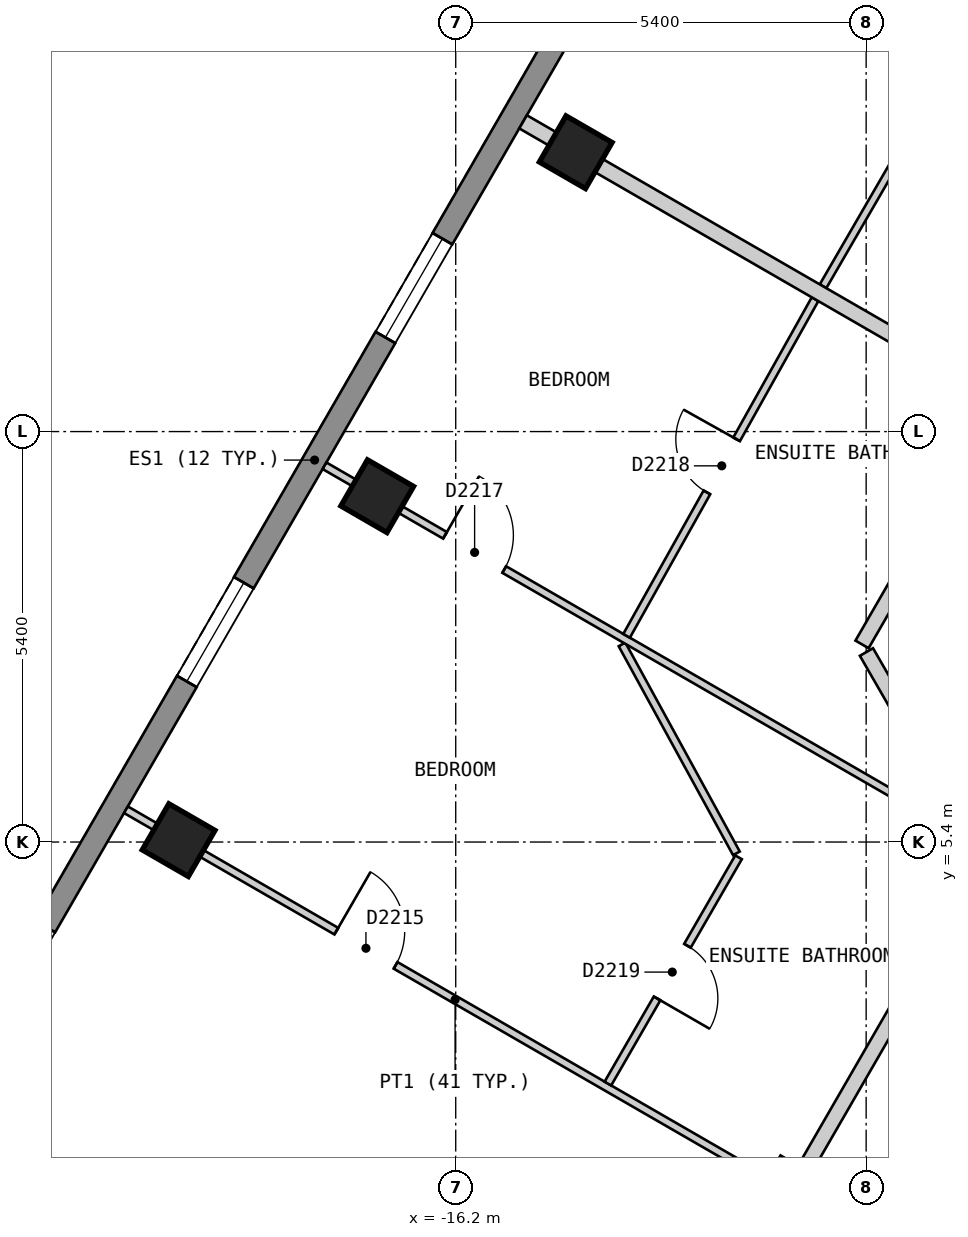
"""IFC4 building model, lengths in metres.
Left out: names, types, materials, properties, quantities, classifications, styles, units other than length and angle.
Written with IfcOpenShell. Run it as: python <this file> out.ifc"""

import sys

from ifc_helpers import new_model, si_unit, direction, frame, frame_2d, origin, origin_2d, place, context, subcontext, project, spatial, polyline, rectangle, outline, extrude, element, fill, save


model = new_model("IFC4")
c1 = context("Model", 3, precision=1e-05, world=origin(), true_north=direction((0.0, 1.0)))
c2 = subcontext(c1, "Body", "Model", "MODEL_VIEW")
j1 = project(units=[si_unit("LENGTHUNIT", "METRE"), si_unit("PLANEANGLEUNIT", "RADIAN")], contexts=[c1])
p1 = place(None, origin())
s1 = spatial("IfcSite", under=j1, at=p1, CompositionType="ELEMENT")
p2 = place(p1, origin())
s2 = spatial("IfcBuilding", under=s1, at=p2, CompositionType="ELEMENT")
p3 = place(p2, frame((0.0, 0.0, 223.8)))
s3 = spatial("IfcBuildingStorey", under=s2, at=p3, CompositionType="ELEMENT", Elevation=223.8)
for number, where, z_axis, x_axis in (
    (1, (-14.621, 14.475, 0.0), (0.0, 0.0, 1.0), (-0.5, -0.866, 0.0)),
    (2, (-17.233, 9.95, 0.0), (0.0, 0.0, 1.0), (-0.5, -0.866, 0.0)),
    (3, (-19.846, 5.425, 0.0), (0.0, 0.0, 1.0), (-0.5, -0.866, 0.0)),
    (4, (-11.792, 0.775, 0.0), (0.0, 0.0, 1.0), (-0.5, -0.866, 0.0)),
):
    element("IfcColumn", number, at=place(p3, frame(where, z_axis=z_axis, x_axis=x_axis)), inside=s3, PredefinedType="COLUMN", context=c2, shape_type="SweptSolid", body=[
        extrude(rectangle(XDim=0.7, YDim=0.7, at=origin_2d()), origin(), (0.0, 0.0, 1.0), 3.0),
    ])
p4 = place(p3, frame((-12.514, 20.025, 0.0), z_axis=(0.0, 0.0, 1.0), x_axis=(-0.500003656944, -0.866023292436, 0.0)))
e5 = element("IfcWall", 5, at=p4, inside=s3, PredefinedType="SOLIDWALL", context=c2, shape_type="SweptSolid", body=[
    extrude(outline(polyline([(0.0, -0.15), (22.17, -0.15), (22.09, 0.15), (0.08, 0.15), (0.0, -0.15)])), origin(), (0.0, 0.0, 1.0), 2.7),
])
p5 = place(p4, frame((2.497, 0.0, 0.15)))
e6 = element("IfcOpeningElement", 6, at=p5, cuts=e5, PredefinedType="OPENING", context=c2, shape_type="SweptSolid", body=[
    extrude(rectangle(XDim=1.5, YDim=2.1, at=frame_2d((0.75, 1.05))), frame((0.0, 0.16, 0.0), z_axis=(0.0, -1.0, 0.0), x_axis=(1.0, 0.0, 0.0)), (0.0, 0.0, 1.0), 0.32),
])
p6 = place(p4, frame((7.722, 0.0, 0.15)))
e7 = element("IfcOpeningElement", 7, at=p6, cuts=e5, PredefinedType="OPENING", context=c2, shape_type="SweptSolid", body=[
    extrude(rectangle(XDim=1.5, YDim=2.1, at=frame_2d((0.75, 1.05))), frame((0.0, 0.16, 0.0), z_axis=(0.0, -1.0, 0.0), x_axis=(1.0, 0.0, 0.0)), (0.0, 0.0, 1.0), 0.32),
])
p7 = place(p4, frame((12.948, 0.0, 0.15)))
e8 = element("IfcOpeningElement", 8, at=p7, cuts=e5, PredefinedType="OPENING", context=c2, shape_type="SweptSolid", body=[
    extrude(rectangle(XDim=1.5, YDim=2.1, at=frame_2d((0.75, 1.05))), frame((0.0, 0.16, 0.0), z_axis=(0.0, -1.0, 0.0), x_axis=(1.0, 0.0, 0.0)), (0.0, 0.0, 1.0), 0.32),
])
p8 = place(p4, frame((18.173, 0.0, 0.15)))
e9 = element("IfcOpeningElement", 9, at=p8, cuts=e5, PredefinedType="OPENING", context=c2, shape_type="SweptSolid", body=[
    extrude(rectangle(XDim=1.5, YDim=2.1, at=frame_2d((0.75, 1.05))), frame((0.0, 0.16, 0.0), z_axis=(0.0, -1.0, 0.0), x_axis=(1.0, 0.0, 0.0)), (0.0, 0.0, 1.0), 0.32),
])
p9 = place(p3, frame((-10.796, 7.9, 0.0), z_axis=(0.0, 0.0, 1.0), x_axis=(0.499674397761, -0.866213308731, 0.0)))
e10 = element("IfcWall", 10, at=p9, inside=s3, PredefinedType="PARTITIONING", context=c2, shape_type="SweptSolid", body=[
    extrude(rectangle(XDim=2.785, YDim=0.2, at=frame_2d((1.393, 0.0))), origin(), (0.0, 0.0, 1.0), 2.7),
])
p10 = place(p3, frame((-13.106, -1.5, 0.0), z_axis=(0.0, 0.0, 1.0), x_axis=(0.500025705601, 0.86601056214, 0.0)))
e11 = element("IfcWall", 11, at=p10, inside=s3, PredefinedType="PARTITIONING", context=c2, shape_type="SweptSolid", body=[
    extrude(rectangle(XDim=7.735, YDim=0.2, at=frame_2d((3.868, 0.0))), origin(), (0.0, 0.0, 1.0), 2.7),
])
p11 = place(p3, frame((-10.854, 8.0, 0.0), z_axis=(0.0, 0.0, 1.0), x_axis=(0.499997637144, 0.866026767976, 0.0)))
e12 = element("IfcWall", 12, at=p11, inside=s3, PredefinedType="PARTITIONING", context=c2, shape_type="SweptSolid", body=[
    extrude(rectangle(XDim=10.854, YDim=0.2, at=frame_2d((5.427, 0.0))), origin(), (0.0, 0.0, 1.0), 2.7),
])
p12 = place(p3, frame((-14.012, 8.0, 0.0), z_axis=(0.0, 0.0, 1.0), x_axis=(0.480183343847, -0.877168145963, 0.0)))
e13 = element("IfcWall", 13, at=p12, inside=s3, PredefinedType="PARTITIONING", context=c2, shape_type="SweptSolid", body=[
    extrude(rectangle(XDim=3.134, YDim=0.1, at=frame_2d((1.567, 0.0))), origin(), (0.0, 0.0, 1.0), 2.7),
])
p13 = place(p3, frame((-20.539, 5.825, 0.0), z_axis=(0.0, 0.0, 1.0), x_axis=(0.866089650643, -0.499888704662, 0.0)))
e14 = element("IfcWall", 14, at=p13, inside=s3, PredefinedType="PARTITIONING", context=c2, shape_type="SweptSolid", body=[
    extrude(rectangle(XDim=10.0, YDim=0.1, at=frame_2d((5.0, 0.0))), origin(), (0.0, 0.0, 1.0), 2.7),
])
p14 = place(p13, frame((3.196, 0.0, 0.0)))
e15 = element("IfcOpeningElement", 15, at=p14, cuts=e14, PredefinedType="OPENING", context=c2, shape_type="SweptSolid", body=[
    extrude(rectangle(XDim=0.9, YDim=2.1, at=frame_2d((0.45, 1.05))), frame((0.0, 0.06, 0.0), z_axis=(0.0, -1.0, 0.0), x_axis=(1.0, 0.0, 0.0)), (0.0, 0.0, 1.0), 0.12),
])
p15 = place(p3, frame((-17.926, 10.35, 0.0), z_axis=(0.0, 0.0, 1.0), x_axis=(0.866018411306, -0.500012111133, 0.0)))
e16 = element("IfcWall", 16, at=p15, inside=s3, PredefinedType="PARTITIONING", context=c2, shape_type="SweptSolid", body=[
    extrude(rectangle(XDim=9.898, YDim=0.1, at=frame_2d((4.949, 0.0))), origin(), (0.0, 0.0, 1.0), 2.7),
])
p16 = place(p15, frame((1.83, 0.0, 0.0)))
e17 = element("IfcOpeningElement", 17, at=p16, cuts=e16, PredefinedType="OPENING", context=c2, shape_type="SweptSolid", body=[
    extrude(rectangle(XDim=0.9, YDim=2.1, at=frame_2d((0.45, 1.05))), frame((0.0, 0.06, 0.0), z_axis=(0.0, -1.0, 0.0), x_axis=(1.0, 0.0, 0.0)), (0.0, 0.0, 1.0), 0.12),
])
p17 = place(p3, frame((-14.198, 2.222, 0.0), z_axis=(0.0, 0.0, 1.0), x_axis=(0.500042121486, 0.866001083567, 0.0)))
e18 = element("IfcWall", 18, at=p17, inside=s3, PredefinedType="PARTITIONING", context=c2, shape_type="SweptSolid", body=[
    extrude(rectangle(XDim=3.438, YDim=0.1, at=frame_2d((1.719, 0.0))), origin(), (0.0, 0.0, 1.0), 2.7),
])
p18 = place(p17, frame((1.294, 0.0, 0.0)))
e19 = element("IfcOpeningElement", 19, at=p18, cuts=e18, PredefinedType="OPENING", context=c2, shape_type="SweptSolid", body=[
    extrude(rectangle(XDim=0.8, YDim=2.1, at=frame_2d((0.4, 1.05))), frame((0.0, 0.06, 0.0), z_axis=(0.0, -1.0, 0.0), x_axis=(1.0, 0.0, 0.0)), (0.0, 0.0, 1.0), 0.12),
])
p19 = place(p3, frame((-11.367, 12.712, 0.0), z_axis=(0.0, 0.0, 1.0), x_axis=(0.501473866443, 0.865172792727, 0.0)))
e20 = element("IfcWall", 20, at=p19, inside=s3, PredefinedType="PARTITIONING", context=c2, shape_type="SweptSolid", body=[
    extrude(rectangle(XDim=7.256, YDim=0.1, at=frame_2d((3.628, 0.0))), origin(), (0.0, 0.0, 1.0), 2.7),
])
p20 = place(p19, frame((3.228, 0.0, 0.0)))
e21 = element("IfcOpeningElement", 21, at=p20, cuts=e20, PredefinedType="OPENING", context=c2, shape_type="SweptSolid", body=[
    extrude(rectangle(XDim=0.8, YDim=2.1, at=frame_2d((0.4, 1.05))), frame((0.0, 0.06, 0.0), z_axis=(0.0, -1.0, 0.0), x_axis=(1.0, 0.0, 0.0)), (0.0, 0.0, 1.0), 0.12),
])
p21 = place(p3, frame((-13.952, 8.113, 0.0), z_axis=(0.0, 0.0, 1.0), x_axis=(0.488568218554, 0.872525699231, 0.0)))
e22 = element("IfcWall", 22, at=p21, inside=s3, PredefinedType="PARTITIONING", context=c2, shape_type="SweptSolid", body=[
    extrude(rectangle(XDim=5.076, YDim=0.1, at=frame_2d((2.538, 0.0))), origin(), (0.0, 0.0, 1.0), 2.7),
])
p22 = place(p21, frame((2.163, 0.0, 0.0)))
e23 = element("IfcOpeningElement", 23, at=p22, cuts=e22, PredefinedType="OPENING", context=c2, shape_type="SweptSolid", body=[
    extrude(rectangle(XDim=0.8, YDim=2.1, at=frame_2d((0.4, 1.05))), frame((0.0, 0.06, 0.0), z_axis=(0.0, -1.0, 0.0), x_axis=(1.0, 0.0, 0.0)), (0.0, 0.0, 1.0), 0.12),
])
p23 = place(p3, frame((-15.314, 14.875, 0.0), z_axis=(0.0, 0.0, 1.0), x_axis=(0.866001485781, -0.500041424909, 0.0)))
e24 = element("IfcWall", 24, at=p23, inside=s3, PredefinedType="PARTITIONING", context=c2, shape_type="SweptSolid", body=[
    extrude(rectangle(XDim=7.2, YDim=0.2, at=frame_2d((3.6, 0.0))), origin(), (0.0, 0.0, 1.0), 2.7),
])
p24 = place(p6, origin())
e25 = element("IfcWindow", 25, at=p24, inside=s3, PartitioningType="SINGLE_PANEL", PredefinedType="WINDOW", context=c2, shape_type="SweptSolid", body=[
    extrude(rectangle(XDim=1.5, YDim=2.1, at=frame_2d((0.75, 1.05))), frame((0.0, 0.03, 0.0), z_axis=(0.0, -1.0, 0.0), x_axis=(1.0, 0.0, 0.0)), (0.0, 0.0, 1.0), 0.06),
])
fill(e7, e25)
p25 = place(p7, origin())
e26 = element("IfcWindow", 26, at=p25, inside=s3, PartitioningType="SINGLE_PANEL", PredefinedType="WINDOW", context=c2, shape_type="SweptSolid", body=[
    extrude(rectangle(XDim=1.5, YDim=2.1, at=frame_2d((0.75, 1.05))), frame((0.0, 0.03, 0.0), z_axis=(0.0, -1.0, 0.0), x_axis=(1.0, 0.0, 0.0)), (0.0, 0.0, 1.0), 0.06),
])
fill(e8, e26)
p26 = place(p14, origin())
e27 = element("IfcDoor", 27, at=p26, inside=s3, OperationType="SINGLE_SWING_LEFT", PredefinedType="DOOR", context=c2, shape_type="SweptSolid", body=[
    extrude(rectangle(XDim=0.9, YDim=2.1, at=frame_2d((0.45, 1.05))), frame((0.0, 0.025, 0.0), z_axis=(0.0, -1.0, 0.0), x_axis=(1.0, 0.0, 0.0)), (0.0, 0.0, 1.0), 0.05),
])
fill(e15, e27)
p27 = place(p16, origin())
e28 = element("IfcDoor", 28, at=p27, inside=s3, OperationType="SINGLE_SWING_LEFT", PredefinedType="DOOR", context=c2, shape_type="SweptSolid", body=[
    extrude(rectangle(XDim=0.9, YDim=2.1, at=frame_2d((0.45, 1.05))), frame((0.0, 0.025, 0.0), z_axis=(0.0, -1.0, 0.0), x_axis=(1.0, 0.0, 0.0)), (0.0, 0.0, 1.0), 0.05),
])
fill(e17, e28)
p28 = place(p22, origin())
e29 = element("IfcDoor", 29, at=p28, inside=s3, OperationType="SINGLE_SWING_RIGHT", PredefinedType="DOOR", context=c2, shape_type="SweptSolid", body=[
    extrude(rectangle(XDim=0.8, YDim=2.1, at=frame_2d((0.4, 1.05))), frame((0.0, 0.025, 0.0), z_axis=(0.0, -1.0, 0.0), x_axis=(1.0, 0.0, 0.0)), (0.0, 0.0, 1.0), 0.05),
])
fill(e23, e29)
p29 = place(p18, origin())
e30 = element("IfcDoor", 30, at=p29, inside=s3, OperationType="SINGLE_SWING_LEFT", PredefinedType="DOOR", context=c2, shape_type="SweptSolid", body=[
    extrude(rectangle(XDim=0.8, YDim=2.1, at=frame_2d((0.4, 1.05))), frame((0.0, 0.025, 0.0), z_axis=(0.0, -1.0, 0.0), x_axis=(1.0, 0.0, 0.0)), (0.0, 0.0, 1.0), 0.05),
])
fill(e19, e30)
save(model, sys.argv[1])
